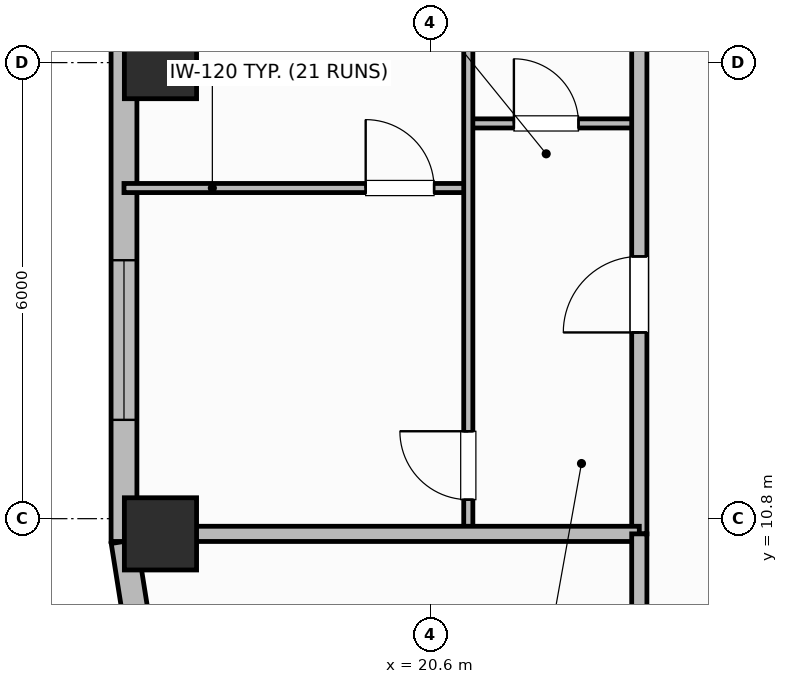
"""IFC4 building model, lengths in metres.
Left out: names, types, materials, properties, quantities, classifications, styles, units other than length and angle.
Written with IfcOpenShell. Run it as: python <this file> out.ifc"""

import sys

from ifc_helpers import new_model, si_unit, direction, frame, frame_2d, origin, origin_2d, place, context, subcontext, project, spatial, rectangle, extrude, element, fill, save


model = new_model("IFC4")
c1 = context("Model", 3, precision=1e-05, world=origin(), true_north=direction((0.0, 1.0)))
c2 = subcontext(c1, "Body", "Model", "MODEL_VIEW")
j1 = project(units=[si_unit("LENGTHUNIT", "METRE"), si_unit("PLANEANGLEUNIT", "RADIAN")], contexts=[c1])
p1 = place(None, origin())
s1 = spatial("IfcSite", under=j1, at=p1, CompositionType="ELEMENT")
p2 = place(p1, origin())
s2 = spatial("IfcBuilding", under=s1, at=p2, CompositionType="ELEMENT")
p3 = place(p2, frame((0.0, 0.0, 158.9)))
s3 = spatial("IfcBuildingStorey", under=s2, at=p3, CompositionType="ELEMENT", Elevation=158.9)
for number, where, z_axis, x_axis in (
    (1, (17.05, 10.6, 0.0), (0.0, 0.0, 1.0), (1.0, 0.0, 0.0)),
    (2, (17.05, 16.8, 0.0), (0.0, 0.0, 1.0), (1.0, 0.0, 0.0)),
):
    element("IfcColumn", number, at=place(p3, frame(where, z_axis=z_axis, x_axis=x_axis)), inside=s3, PredefinedType="COLUMN", context=c2, shape_type="SweptSolid", body=[
        extrude(rectangle(XDim=0.95, YDim=0.95, at=origin_2d()), origin(), (0.0, 0.0, 1.0), 3.7),
    ])
p4 = place(p3, frame((16.57, 10.5, 0.0), z_axis=(0.0, 0.0, 1.0), x_axis=(0.156514556949, -0.987675651954, 0.0)))
e3 = element("IfcWall", 3, at=p4, inside=s3, PredefinedType="SOLIDWALL", context=c2, shape_type="SweptSolid", body=[
    extrude(rectangle(XDim=1.135, YDim=0.34, at=frame_2d((0.568, 0.0))), origin(), (0.0, 0.0, 1.0), 2.72),
])
p5 = place(p3, frame((16.57, 23.8, 0.0), z_axis=(0.0, 0.0, 1.0), x_axis=(0.0, -1.0, 0.0)))
e4 = element("IfcWall", 4, at=p5, inside=s3, PredefinedType="SOLIDWALL", context=c2, shape_type="SweptSolid", body=[
    extrude(rectangle(XDim=13.3, YDim=0.34, at=frame_2d((6.65, 0.0))), origin(), (0.0, 0.0, 1.0), 2.72),
])
p6 = place(p5, frame((2.1, 0.0, 0.0)))
e5 = element("IfcOpeningElement", 5, at=p6, cuts=e4, PredefinedType="OPENING", context=c2, shape_type="SweptSolid", body=[
    extrude(rectangle(XDim=1.6, YDim=2.1, at=frame_2d((0.8, 1.05))), frame((0.0, 0.18, 0.0), z_axis=(0.0, -1.0, 0.0), x_axis=(1.0, 0.0, 0.0)), (0.0, 0.0, 1.0), 0.36),
])
p7 = place(p5, frame((9.6, 0.0, 0.7)))
e6 = element("IfcOpeningElement", 6, at=p7, cuts=e4, PredefinedType="OPENING", context=c2, shape_type="SweptSolid", body=[
    extrude(rectangle(XDim=2.1, YDim=1.9, at=frame_2d((1.05, 0.95))), frame((0.0, 0.18, 0.0), z_axis=(0.0, -1.0, 0.0), x_axis=(1.0, 0.0, 0.0)), (0.0, 0.0, 1.0), 0.36),
])
p8 = place(p3, frame((21.1, 16.0, 0.0), z_axis=(0.0, 0.0, 1.0), x_axis=(1.0, 0.0, 0.0)))
e7 = element("IfcWall", 7, at=p8, inside=s3, PredefinedType="PARTITIONING", context=c2, shape_type="SweptSolid", body=[
    extrude(rectangle(XDim=2.25, YDim=0.12, at=frame_2d((1.125, 0.0))), origin(), (0.0, 0.0, 1.0), 2.55),
])
p9 = place(p8, frame((0.6, 0.0, 0.0)))
e8 = element("IfcOpeningElement", 8, at=p9, cuts=e7, PredefinedType="OPENING", context=c2, shape_type="SweptSolid", body=[
    extrude(rectangle(XDim=0.85, YDim=2.1, at=frame_2d((0.425, 1.05))), frame((0.0, 0.07, 0.0), z_axis=(0.0, -1.0, 0.0), x_axis=(1.0, 0.0, 0.0)), (0.0, 0.0, 1.0), 0.14),
])
p10 = place(p3, frame((16.57, 15.15, 0.0), z_axis=(0.0, 0.0, 1.0), x_axis=(1.0, 0.0, 0.0)))
e9 = element("IfcWall", 9, at=p10, inside=s3, PredefinedType="PARTITIONING", context=c2, shape_type="SweptSolid", body=[
    extrude(rectangle(XDim=4.53, YDim=0.12, at=frame_2d((2.265, 0.0))), origin(), (0.0, 0.0, 1.0), 2.55),
])
p11 = place(p10, frame((3.18, 0.0, 0.0)))
e10 = element("IfcOpeningElement", 10, at=p11, cuts=e9, PredefinedType="OPENING", context=c2, shape_type="SweptSolid", body=[
    extrude(rectangle(XDim=0.9, YDim=2.1, at=frame_2d((0.45, 1.05))), frame((0.0, 0.07, 0.0), z_axis=(0.0, -1.0, 0.0), x_axis=(1.0, 0.0, 0.0)), (0.0, 0.0, 1.0), 0.14),
])
p12 = place(p3, frame((21.1, 10.64, 0.0), z_axis=(0.0, 0.0, 1.0), x_axis=(0.0, 1.0, 0.0)))
e11 = element("IfcWall", 11, at=p12, inside=s3, PredefinedType="PARTITIONING", context=c2, shape_type="SweptSolid", body=[
    extrude(rectangle(XDim=12.02, YDim=0.12, at=frame_2d((6.01, 0.0))), origin(), (0.0, 0.0, 1.0), 2.55),
])
p13 = place(p12, frame((0.41, 0.0, 0.0)))
e12 = element("IfcOpeningElement", 12, at=p13, cuts=e11, PredefinedType="OPENING", context=c2, shape_type="SweptSolid", body=[
    extrude(rectangle(XDim=0.9, YDim=2.1, at=frame_2d((0.45, 1.05))), frame((0.0, 0.07, 0.0), z_axis=(0.0, -1.0, 0.0), x_axis=(1.0, 0.0, 0.0)), (0.0, 0.0, 1.0), 0.14),
])
p14 = place(p12, frame((10.185, 0.0, 0.0)))
e13 = element("IfcOpeningElement", 13, at=p14, cuts=e11, PredefinedType="OPENING", context=c2, shape_type="SweptSolid", body=[
    extrude(rectangle(XDim=0.82, YDim=2.08, at=frame_2d((0.41, 1.04))), frame((0.0, 0.07, 0.0), z_axis=(0.0, -1.0, 0.0), x_axis=(1.0, 0.0, 0.0)), (0.0, 0.0, 1.0), 0.14),
])
p15 = place(p3, frame((23.35, 10.6, 0.0), z_axis=(0.0, 0.0, 1.0), x_axis=(0.0, 1.0, 0.0)))
e14 = element("IfcWall", 14, at=p15, inside=s3, PredefinedType="PARTITIONING", context=c2, shape_type="SweptSolid", body=[
    extrude(rectangle(XDim=35.2, YDim=0.2, at=frame_2d((17.6, 0.0))), origin(), (0.0, 0.0, 1.0), 2.55),
])
p16 = place(p15, frame((2.65, 0.0, 0.0)))
e15 = element("IfcOpeningElement", 15, at=p16, cuts=e14, PredefinedType="OPENING", context=c2, shape_type="SweptSolid", body=[
    extrude(rectangle(XDim=1.0, YDim=2.15, at=frame_2d((0.5, 1.075))), frame((0.0, 0.11, 0.0), z_axis=(0.0, -1.0, 0.0), x_axis=(1.0, 0.0, 0.0)), (0.0, 0.0, 1.0), 0.22),
])
p17 = place(p15, frame((12.65, 0.0, 0.0)))
e16 = element("IfcOpeningElement", 16, at=p17, cuts=e14, PredefinedType="OPENING", context=c2, shape_type="SweptSolid", body=[
    extrude(rectangle(XDim=1.0, YDim=2.15, at=frame_2d((0.5, 1.075))), frame((0.0, 0.11, 0.0), z_axis=(0.0, -1.0, 0.0), x_axis=(1.0, 0.0, 0.0)), (0.0, 0.0, 1.0), 0.22),
])
p18 = place(p15, frame((23.782, 0.0, 0.0)))
e17 = element("IfcOpeningElement", 17, at=p18, cuts=e14, PredefinedType="OPENING", context=c2, shape_type="SweptSolid", body=[
    extrude(rectangle(XDim=1.0, YDim=2.15, at=frame_2d((0.5, 1.075))), frame((0.0, 0.11, 0.0), z_axis=(0.0, -1.0, 0.0), x_axis=(1.0, 0.0, 0.0)), (0.0, 0.0, 1.0), 0.22),
])
p19 = place(p3, frame((16.99, 10.6, 0.0), z_axis=(0.0, 0.0, 1.0), x_axis=(1.0, 0.0, 0.0)))
e18 = element("IfcWall", 18, at=p19, inside=s3, PredefinedType="PARTITIONING", context=c2, shape_type="SweptSolid", body=[
    extrude(rectangle(XDim=6.36, YDim=0.2, at=frame_2d((3.18, 0.0))), origin(), (0.0, 0.0, 1.0), 2.55),
])
p20 = place(p3, frame((23.35, 6.87, 0.0), z_axis=(0.0, 0.0, 1.0), x_axis=(0.0, 1.0, 0.0)))
e19 = element("IfcWall", 19, at=p20, inside=s3, PredefinedType="PARTITIONING", context=c2, shape_type="SweptSolid", body=[
    extrude(rectangle(XDim=3.73, YDim=0.2, at=frame_2d((1.865, 0.0))), origin(), (0.0, 0.0, 1.0), 2.55),
])
p21 = place(p7, origin())
e20 = element("IfcWindow", 20, at=p21, inside=s3, PartitioningType="SINGLE_PANEL", PredefinedType="WINDOW", context=c2, shape_type="SweptSolid", body=[
    extrude(rectangle(XDim=2.1, YDim=1.9, at=frame_2d((1.05, 0.95))), frame((0.0, 0.03, 0.0), z_axis=(0.0, -1.0, 0.0), x_axis=(1.0, 0.0, 0.0)), (0.0, 0.0, 1.0), 0.06),
])
fill(e6, e20)
p22 = place(p9, origin())
e21 = element("IfcDoor", 21, at=p22, inside=s3, OperationType="SINGLE_SWING_LEFT", PredefinedType="DOOR", context=c2, shape_type="SweptSolid", body=[
    extrude(rectangle(XDim=0.85, YDim=2.1, at=frame_2d((0.425, 1.05))), frame((0.0, 0.025, 0.0), z_axis=(0.0, -1.0, 0.0), x_axis=(1.0, 0.0, 0.0)), (0.0, 0.0, 1.0), 0.05),
])
fill(e8, e21)
p23 = place(p11, origin())
e22 = element("IfcDoor", 22, at=p23, inside=s3, OperationType="SINGLE_SWING_LEFT", PredefinedType="DOOR", context=c2, shape_type="SweptSolid", body=[
    extrude(rectangle(XDim=0.9, YDim=2.1, at=frame_2d((0.45, 1.05))), frame((0.0, 0.025, 0.0), z_axis=(0.0, -1.0, 0.0), x_axis=(1.0, 0.0, 0.0)), (0.0, 0.0, 1.0), 0.05),
])
fill(e10, e22)
p24 = place(p13, origin())
e23 = element("IfcDoor", 23, at=p24, inside=s3, OperationType="SINGLE_SWING_RIGHT", PredefinedType="DOOR", context=c2, shape_type="SweptSolid", body=[
    extrude(rectangle(XDim=0.9, YDim=2.1, at=frame_2d((0.45, 1.05))), frame((0.0, 0.025, 0.0), z_axis=(0.0, -1.0, 0.0), x_axis=(1.0, 0.0, 0.0)), (0.0, 0.0, 1.0), 0.05),
])
fill(e12, e23)
p25 = place(p16, origin())
e24 = element("IfcDoor", 24, at=p25, inside=s3, OperationType="SINGLE_SWING_LEFT", PredefinedType="DOOR", context=c2, shape_type="SweptSolid", body=[
    extrude(rectangle(XDim=1.0, YDim=2.15, at=frame_2d((0.5, 1.075))), frame((0.0, 0.025, 0.0), z_axis=(0.0, -1.0, 0.0), x_axis=(1.0, 0.0, 0.0)), (0.0, 0.0, 1.0), 0.05),
])
fill(e15, e24)
save(model, sys.argv[1])
